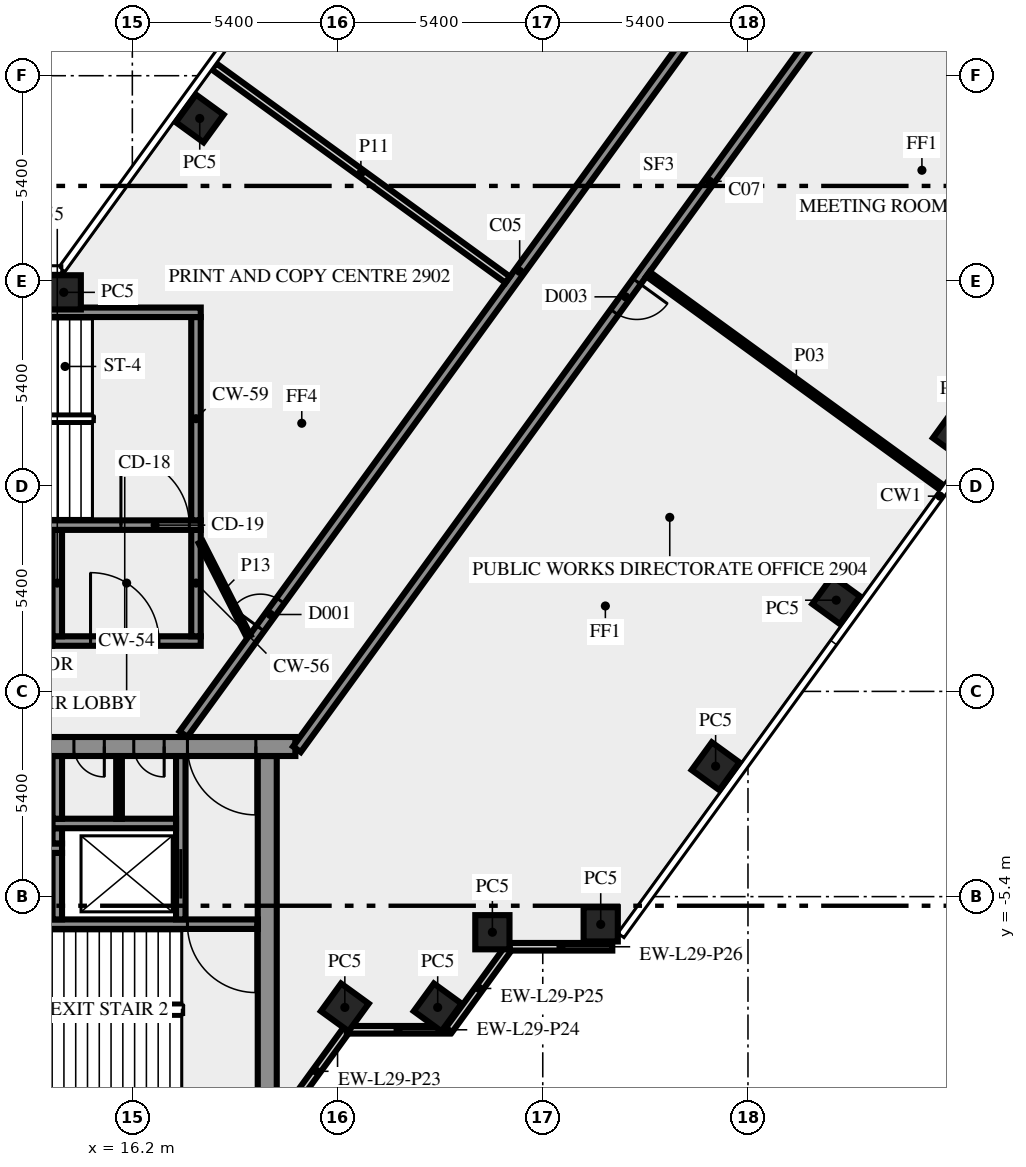
"""IFC4 building model, lengths in metres.
Left out: names, types, materials, properties, quantities, classifications, styles, units other than length and angle.
Written with IfcOpenShell. Run it as: python <this file> out.ifc"""

import sys

from ifc_helpers import new_model, si_unit, direction, frame, frame_2d, origin, origin_2d, place, context, subcontext, project, spatial, rectangle, extrude, element, fill, save


model = new_model("IFC4")
c1 = context("Model", 3, precision=1e-05, world=origin(), true_north=direction((0.0, 1.0)))
c2 = subcontext(c1, "Body", "Model", "MODEL_VIEW")
j1 = project(units=[si_unit("LENGTHUNIT", "METRE"), si_unit("PLANEANGLEUNIT", "RADIAN")], contexts=[c1])
p1 = place(None, origin())
s1 = spatial("IfcSite", under=j1, at=p1, CompositionType="ELEMENT")
p2 = place(p1, origin())
s2 = spatial("IfcBuilding", under=s1, at=p2, CompositionType="ELEMENT")
p3 = place(p2, frame((0.0, 0.0, 125.0)))
s3 = spatial("IfcBuildingStorey", under=s2, at=p3, CompositionType="ELEMENT", Elevation=125.0)
for number, where, z_axis, x_axis in (
    (1, (21.792, -8.315, 0.0), (0.0, 0.0, 1.0), (0.588, 0.809, 0.0)),
    (2, (24.235, -8.315, 0.0), (0.0, 0.0, 1.0), (0.588, 0.809, 0.0)),
    (3, (25.674, -6.337, 0.0), (0.0, 0.0, 1.0), (1.0, 0.0, 0.0)),
    (4, (28.525, -6.13, 0.0), (0.0, 0.0, 1.0), (1.0, 0.0, 0.0)),
    (5, (31.548, -1.969, 0.0), (0.0, 0.0, 1.0), (0.588, 0.809, 0.0)),
    (6, (34.722, 2.4, 0.0), (0.0, 0.0, 1.0), (0.588, 0.809, 0.0)),
    (7, (37.896, 6.769, 0.0), (0.0, 0.0, 1.0), (0.588, 0.809, 0.0)),
    (8, (17.974, 15.075, 0.0), (0.0, 0.0, 1.0), (-0.588, -0.809, 0.0)),
    (9, (14.395, 10.5, 0.0), (0.0, 0.0, 1.0), (-1.0, 0.0, 0.0)),
):
    element("IfcColumn", number, at=place(p3, frame(where, z_axis=z_axis, x_axis=x_axis)), inside=s3, PredefinedType="COLUMN", context=c2, shape_type="SweptSolid", body=[
        extrude(rectangle(XDim=0.9, YDim=0.9, at=origin_2d()), origin(), (0.0, 0.0, 1.0), 3.65),
    ])
p4 = place(p3, frame((20.253, -11.083, 0.0), z_axis=(0.0, 0.0, 1.0), x_axis=(0.587766567315, 0.809030569476, 0.0)))
e10 = element("IfcWall", 10, at=p4, inside=s3, PredefinedType="SOLIDWALL", context=c2, shape_type="SweptSolid", body=[
    extrude(rectangle(XDim=2.688, YDim=0.2, at=frame_2d((1.344, 0.0))), origin(), (0.0, 0.0, 1.0), 3.65),
])
p5 = place(p3, frame((21.843, -8.904, 0.0), z_axis=(0.0, 0.0, 1.0), x_axis=(1.0, 0.0, 0.0)))
e11 = element("IfcWall", 11, at=p5, inside=s3, PredefinedType="SOLIDWALL", context=c2, shape_type="SweptSolid", body=[
    extrude(rectangle(XDim=2.7, YDim=0.2, at=frame_2d((1.35, 0.0))), origin(), (0.0, 0.0, 1.0), 3.65),
])
p6 = place(p3, frame((24.533, -8.909, 0.0), z_axis=(0.0, 0.0, 1.0), x_axis=(0.587720002413, 0.809064397168, 0.0)))
e12 = element("IfcWall", 12, at=p6, inside=s3, PredefinedType="SOLIDWALL", context=c2, shape_type="SweptSolid", body=[
    extrude(rectangle(XDim=2.7, YDim=0.2, at=frame_2d((1.35, 0.0))), origin(), (0.0, 0.0, 1.0), 3.65),
])
p7 = place(p3, frame((26.13, -6.719, 0.0), z_axis=(0.0, 0.0, 1.0), x_axis=(1.0, 0.0, 0.0)))
e13 = element("IfcWall", 13, at=p7, inside=s3, PredefinedType="SOLIDWALL", context=c2, shape_type="SweptSolid", body=[
    extrude(rectangle(XDim=2.7, YDim=0.2, at=frame_2d((1.35, 0.0))), origin(), (0.0, 0.0, 1.0), 3.65),
])
p8 = place(p3, frame((19.75, -10.5, 0.0), z_axis=(0.0, 0.0, 1.0), x_axis=(0.0, 1.0, 0.0)))
e14 = element("IfcWall", 14, at=p8, inside=s3, PredefinedType="SHEAR", context=c2, shape_type="SweptSolid", body=[
    extrude(rectangle(XDim=8.8, YDim=0.5, at=frame_2d((4.4, 0.0))), origin(), (0.0, 0.0, 1.0), 3.65),
])
p9 = place(p3, frame((19.5, -6.125, 0.0), z_axis=(0.0, 0.0, 1.0), x_axis=(-1.0, 0.0, 0.0)))
e15 = element("IfcWall", 15, at=p9, inside=s3, PredefinedType="SHEAR", context=c2, shape_type="SweptSolid", body=[
    extrude(rectangle(XDim=8.05, YDim=0.25, at=frame_2d((4.025, 0.0))), origin(), (0.0, 0.0, 1.0), 3.65),
])
p10 = place(p9, frame((0.05, 0.0, 0.0)))
e16 = element("IfcOpeningElement", 16, at=p10, cuts=e15, PredefinedType="OPENING", context=c2, shape_type="SweptSolid", body=[
    extrude(rectangle(XDim=1.8, YDim=2.1, at=frame_2d((0.9, 1.05))), frame((0.0, 0.135, 0.0), z_axis=(0.0, -1.0, 0.0), x_axis=(1.0, 0.0, 0.0)), (0.0, 0.0, 1.0), 0.27),
])
p11 = place(p3, frame((14.225, -6.0, 0.0), z_axis=(0.0, 0.0, 1.0), x_axis=(0.0, 1.0, 0.0)))
e17 = element("IfcWall", 17, at=p11, inside=s3, PredefinedType="SHEAR", context=c2, shape_type="SweptSolid", body=[
    extrude(rectangle(XDim=1.75, YDim=0.25, at=frame_2d((0.875, 0.0))), origin(), (0.0, 0.0, 1.0), 3.65),
])
p12 = place(p3, frame((17.475, -6.0, 0.0), z_axis=(0.0, 0.0, 1.0), x_axis=(0.0, 1.0, 0.0)))
e18 = element("IfcWall", 18, at=p12, inside=s3, PredefinedType="SHEAR", context=c2, shape_type="SweptSolid", body=[
    extrude(rectangle(XDim=4.3, YDim=0.25, at=frame_2d((2.15, 0.0))), origin(), (0.0, 0.0, 1.0), 3.65),
])
p13 = place(p12, frame((0.55, 0.0, 0.0)))
e19 = element("IfcOpeningElement", 19, at=p13, cuts=e18, PredefinedType="OPENING", context=c2, shape_type="SweptSolid", body=[
    extrude(rectangle(XDim=1.3, YDim=2.1, at=frame_2d((0.65, 1.05))), frame((0.0, 0.135, 0.0), z_axis=(0.0, -1.0, 0.0), x_axis=(1.0, 0.0, 0.0)), (0.0, 0.0, 1.0), 0.27),
])
p14 = place(p3, frame((1.45, -4.125, 0.0), z_axis=(0.0, 0.0, 1.0), x_axis=(1.0, 0.0, 0.0)))
e20 = element("IfcWall", 20, at=p14, inside=s3, PredefinedType="SHEAR", context=c2, shape_type="SweptSolid", body=[
    extrude(rectangle(XDim=12.9, YDim=0.25, at=frame_2d((6.45, 0.0))), origin(), (0.0, 0.0, 1.0), 3.65),
])
p15 = place(p14, frame((0.7, 0.0, 0.0)))
e21 = element("IfcOpeningElement", 21, at=p15, cuts=e20, PredefinedType="OPENING", context=c2, shape_type="SweptSolid", body=[
    extrude(rectangle(XDim=1.3, YDim=2.1, at=frame_2d((0.65, 1.05))), frame((0.0, 0.135, 0.0), z_axis=(0.0, -1.0, 0.0), x_axis=(1.0, 0.0, 0.0)), (0.0, 0.0, 1.0), 0.27),
])
p16 = place(p3, frame((14.225, -4.0, 0.0), z_axis=(0.0, 0.0, 1.0), x_axis=(0.0, 1.0, 0.0)))
e22 = element("IfcWall", 22, at=p16, inside=s3, PredefinedType="SHEAR", context=c2, shape_type="SweptSolid", body=[
    extrude(rectangle(XDim=0.4, YDim=0.25, at=frame_2d((0.2, 0.0))), origin(), (0.0, 0.0, 1.0), 3.65),
])
p17 = place(p3, frame((14.1, -3.475, 0.0), z_axis=(0.0, 0.0, 1.0), x_axis=(1.0, 0.0, 0.0)))
e23 = element("IfcWall", 23, at=p17, inside=s3, PredefinedType="SHEAR", context=c2, shape_type="SweptSolid", body=[
    extrude(rectangle(XDim=3.25, YDim=0.25, at=frame_2d((1.625, 0.0))), origin(), (0.0, 0.0, 1.0), 3.65),
])
p18 = place(p3, frame((14.225, -3.35, 0.0), z_axis=(0.0, 0.0, 1.0), x_axis=(0.0, 1.0, 0.0)))
e24 = element("IfcWall", 24, at=p18, inside=s3, PredefinedType="SHEAR", context=c2, shape_type="SweptSolid", body=[
    extrude(rectangle(XDim=1.65, YDim=0.25, at=frame_2d((0.825, 0.0))), origin(), (0.0, 0.0, 1.0), 3.65),
])
p19 = place(p3, frame((15.85, -3.35, 0.0), z_axis=(0.0, 0.0, 1.0), x_axis=(0.0, 1.0, 0.0)))
e25 = element("IfcWall", 25, at=p19, inside=s3, PredefinedType="PARTITIONING", context=c2, shape_type="SweptSolid", body=[
    extrude(rectangle(XDim=1.65, YDim=0.15, at=frame_2d((0.825, 0.0))), origin(), (0.0, 0.0, 1.0), 3.65),
])
p20 = place(p3, frame((20.49, -1.45, 0.0), z_axis=(0.0, 0.0, 1.0), x_axis=(-1.0, 0.0, 0.0)))
e26 = element("IfcWall", 26, at=p20, inside=s3, PredefinedType="SHEAR", context=c2, shape_type="SweptSolid", body=[
    extrude(rectangle(XDim=40.98, YDim=0.5, at=frame_2d((20.49, 0.0))), origin(), (0.0, 0.0, 1.0), 3.65),
])
p21 = place(p20, frame((38.14, 0.0, 0.0)))
e27 = element("IfcOpeningElement", 27, at=p21, cuts=e26, PredefinedType="OPENING", context=c2, shape_type="SweptSolid", body=[
    extrude(rectangle(XDim=1.8, YDim=2.1, at=frame_2d((0.9, 1.05))), frame((0.0, 0.26, 0.0), z_axis=(0.0, -1.0, 0.0), x_axis=(1.0, 0.0, 0.0)), (0.0, 0.0, 1.0), 0.52),
])
p22 = place(p20, frame((35.89, 0.0, 0.0)))
e28 = element("IfcOpeningElement", 28, at=p22, cuts=e26, PredefinedType="OPENING", context=c2, shape_type="SweptSolid", body=[
    extrude(rectangle(XDim=0.9, YDim=2.1, at=frame_2d((0.45, 1.05))), frame((0.0, 0.26, 0.0), z_axis=(0.0, -1.0, 0.0), x_axis=(1.0, 0.0, 0.0)), (0.0, 0.0, 1.0), 0.52),
])
p23 = place(p20, frame((32.94, 0.0, 0.0)))
e29 = element("IfcOpeningElement", 29, at=p23, cuts=e26, PredefinedType="OPENING", context=c2, shape_type="SweptSolid", body=[
    extrude(rectangle(XDim=0.9, YDim=2.1, at=frame_2d((0.45, 1.05))), frame((0.0, 0.26, 0.0), z_axis=(0.0, -1.0, 0.0), x_axis=(1.0, 0.0, 0.0)), (0.0, 0.0, 1.0), 0.52),
])
p24 = place(p20, frame((19.59, 0.0, 0.0)))
e30 = element("IfcOpeningElement", 30, at=p24, cuts=e26, PredefinedType="OPENING", context=c2, shape_type="SweptSolid", body=[
    extrude(rectangle(XDim=2.0, YDim=2.1, at=frame_2d((1.0, 1.05))), frame((0.0, 0.26, 0.0), z_axis=(0.0, -1.0, 0.0), x_axis=(1.0, 0.0, 0.0)), (0.0, 0.0, 1.0), 0.52),
])
p25 = place(p20, frame((7.14, 0.0, 0.0)))
e31 = element("IfcOpeningElement", 31, at=p25, cuts=e26, PredefinedType="OPENING", context=c2, shape_type="SweptSolid", body=[
    extrude(rectangle(XDim=0.9, YDim=2.1, at=frame_2d((0.45, 1.05))), frame((0.0, 0.26, 0.0), z_axis=(0.0, -1.0, 0.0), x_axis=(1.0, 0.0, 0.0)), (0.0, 0.0, 1.0), 0.52),
])
p26 = place(p20, frame((5.028, 0.0, 0.0)))
e32 = element("IfcOpeningElement", 32, at=p26, cuts=e26, PredefinedType="OPENING", context=c2, shape_type="SweptSolid", body=[
    extrude(rectangle(XDim=0.8, YDim=2.1, at=frame_2d((0.4, 1.05))), frame((0.0, 0.26, 0.0), z_axis=(0.0, -1.0, 0.0), x_axis=(1.0, 0.0, 0.0)), (0.0, 0.0, 1.0), 0.52),
])
p27 = place(p20, frame((3.452, 0.0, 0.0)))
e33 = element("IfcOpeningElement", 33, at=p27, cuts=e26, PredefinedType="OPENING", context=c2, shape_type="SweptSolid", body=[
    extrude(rectangle(XDim=0.8, YDim=2.1, at=frame_2d((0.4, 1.05))), frame((0.0, 0.26, 0.0), z_axis=(0.0, -1.0, 0.0), x_axis=(1.0, 0.0, 0.0)), (0.0, 0.0, 1.0), 0.52),
])
p28 = place(p20, frame((1.04, 0.0, 0.0)))
e34 = element("IfcOpeningElement", 34, at=p28, cuts=e26, PredefinedType="OPENING", context=c2, shape_type="SweptSolid", body=[
    extrude(rectangle(XDim=1.8, YDim=2.1, at=frame_2d((0.9, 1.05))), frame((0.0, 0.26, 0.0), z_axis=(0.0, -1.0, 0.0), x_axis=(1.0, 0.0, 0.0)), (0.0, 0.0, 1.0), 0.52),
])
p29 = place(p3, frame((14.1, 1.325, 0.0), z_axis=(0.0, 0.0, 1.0), x_axis=(1.0, 0.0, 0.0)))
e35 = element("IfcWall", 35, at=p29, inside=s3, PredefinedType="SHEAR", context=c2, shape_type="SweptSolid", body=[
    extrude(rectangle(XDim=3.9, YDim=0.25, at=frame_2d((1.95, 0.0))), origin(), (0.0, 0.0, 1.0), 3.65),
])
p30 = place(p29, frame((1.0, 0.0, 0.0)))
e36 = element("IfcOpeningElement", 36, at=p30, cuts=e35, PredefinedType="OPENING", context=c2, shape_type="SweptSolid", body=[
    extrude(rectangle(XDim=1.8, YDim=2.1, at=frame_2d((0.9, 1.05))), frame((0.0, 0.135, 0.0), z_axis=(0.0, -1.0, 0.0), x_axis=(1.0, 0.0, 0.0)), (0.0, 0.0, 1.0), 0.27),
])
for number, where, z_axis, x_axis in (
    (37, (14.225, 1.45, 0.0), (0.0, 0.0, 1.0), (0.0, 1.0, 0.0)),
    (38, (17.875, 1.45, 0.0), (0.0, 0.0, 1.0), (0.0, 1.0, 0.0)),
):
    element("IfcWall", number, at=place(p3, frame(where, z_axis=z_axis, x_axis=x_axis)), inside=s3, PredefinedType="SHEAR", context=c2, shape_type="SweptSolid", body=[
        extrude(rectangle(XDim=2.8, YDim=0.25, at=frame_2d((1.4, 0.0))), origin(), (0.0, 0.0, 1.0), 3.65),
    ])
p31 = place(p3, frame((7.5, 4.375, 0.0), z_axis=(0.0, 0.0, 1.0), x_axis=(1.0, 0.0, 0.0)))
e39 = element("IfcWall", 39, at=p31, inside=s3, PredefinedType="SHEAR", context=c2, shape_type="SweptSolid", body=[
    extrude(rectangle(XDim=10.5, YDim=0.25, at=frame_2d((5.25, 0.0))), origin(), (0.0, 0.0, 1.0), 3.65),
])
p32 = place(p31, frame((8.4, 0.0, 0.0)))
e40 = element("IfcOpeningElement", 40, at=p32, cuts=e39, PredefinedType="OPENING", context=c2, shape_type="SweptSolid", body=[
    extrude(rectangle(XDim=1.8, YDim=2.1, at=frame_2d((0.9, 1.05))), frame((0.0, 0.135, 0.0), z_axis=(0.0, -1.0, 0.0), x_axis=(1.0, 0.0, 0.0)), (0.0, 0.0, 1.0), 0.27),
])
p33 = place(p3, frame((17.875, 4.5, 0.0), z_axis=(0.0, 0.0, 1.0), x_axis=(0.0, 1.0, 0.0)))
e41 = element("IfcWall", 41, at=p33, inside=s3, PredefinedType="SHEAR", context=c2, shape_type="SweptSolid", body=[
    extrude(rectangle(XDim=5.35, YDim=0.25, at=frame_2d((2.675, 0.0))), origin(), (0.0, 0.0, 1.0), 3.65),
])
p34 = place(p3, frame((7.5, 9.975, 0.0), z_axis=(0.0, 0.0, 1.0), x_axis=(1.0, 0.0, 0.0)))
e42 = element("IfcWall", 42, at=p34, inside=s3, PredefinedType="SHEAR", context=c2, shape_type="SweptSolid", body=[
    extrude(rectangle(XDim=10.5, YDim=0.25, at=frame_2d((5.25, 0.0))), origin(), (0.0, 0.0, 1.0), 3.65),
])
p35 = place(p34, frame((2.0, 0.0, 1.0)))
e43 = element("IfcOpeningElement", 43, at=p35, cuts=e42, PredefinedType="OPENING", context=c2, shape_type="SweptSolid", body=[
    extrude(rectangle(XDim=1.2, YDim=1.2, at=frame_2d((0.6, 0.6))), frame((0.0, 0.135, 0.0), z_axis=(0.0, -1.0, 0.0), x_axis=(1.0, 0.0, 0.0)), (0.0, 0.0, 1.0), 0.27),
])
p36 = place(p3, frame((17.545, -1.125, 0.0), z_axis=(0.0, 0.0, 1.0), x_axis=(0.587786330937, 0.809016210693, 0.0)))
e44 = element("IfcWall", 44, at=p36, inside=s3, PredefinedType="SOLIDWALL", context=c2, shape_type="SweptSolid", body=[
    extrude(rectangle(XDim=30.103, YDim=0.25, at=frame_2d((15.052, 0.0))), origin(), (0.0, 0.0, 1.0), 3.65),
])
p37 = place(p36, frame((3.441, 0.0, 0.0)))
e45 = element("IfcOpeningElement", 45, at=p37, cuts=e44, PredefinedType="OPENING", context=c2, shape_type="SweptSolid", body=[
    extrude(rectangle(XDim=0.9, YDim=2.1, at=frame_2d((0.45, 1.05))), frame((0.0, 0.135, 0.0), z_axis=(0.0, -1.0, 0.0), x_axis=(1.0, 0.0, 0.0)), (0.0, 0.0, 1.0), 0.27),
])
p38 = place(p36, frame((28.729, 0.0, 0.0)))
e46 = element("IfcOpeningElement", 46, at=p38, cuts=e44, PredefinedType="OPENING", context=c2, shape_type="SweptSolid", body=[
    extrude(rectangle(XDim=0.9, YDim=2.1, at=frame_2d((0.45, 1.05))), frame((0.0, 0.135, 0.0), z_axis=(0.0, -1.0, 0.0), x_axis=(1.0, 0.0, 0.0)), (0.0, 0.0, 1.0), 0.27),
])
p39 = place(p3, frame((37.236, 21.469, 0.0), z_axis=(0.0, 0.0, 1.0), x_axis=(-0.58778344073, -0.809018310549, 0.0)))
e47 = element("IfcWall", 47, at=p39, inside=s3, PredefinedType="SOLIDWALL", context=c2, shape_type="SweptSolid", body=[
    extrude(rectangle(XDim=28.42, YDim=0.25, at=frame_2d((14.21, 0.0))), origin(), (0.0, 0.0, 1.0), 3.65),
])
p40 = place(p39, frame((13.205, 0.0, 0.0)))
e48 = element("IfcOpeningElement", 48, at=p40, cuts=e47, PredefinedType="OPENING", context=c2, shape_type="SweptSolid", body=[
    extrude(rectangle(XDim=1.0, YDim=2.1, at=frame_2d((0.5, 1.05))), frame((0.0, 0.135, 0.0), z_axis=(0.0, -1.0, 0.0), x_axis=(1.0, 0.0, 0.0)), (0.0, 0.0, 1.0), 0.27),
])
p41 = place(p39, frame((0.224, 0.0, 0.0)))
e49 = element("IfcOpeningElement", 49, at=p41, cuts=e47, PredefinedType="OPENING", context=c2, shape_type="SweptSolid", body=[
    extrude(rectangle(XDim=0.9, YDim=2.1, at=frame_2d((0.45, 1.05))), frame((0.0, 0.135, 0.0), z_axis=(0.0, -1.0, 0.0), x_axis=(1.0, 0.0, 0.0)), (0.0, 0.0, 1.0), 0.27),
])
p42 = place(p3, frame((37.577, 5.307, 0.0), z_axis=(0.0, 0.0, 1.0), x_axis=(-0.809032429128, 0.587764007591, 0.0)))
e50 = element("IfcWall", 50, at=p42, inside=s3, PredefinedType="PARTITIONING", context=c2, shape_type="SweptSolid", body=[
    extrude(rectangle(XDim=9.651, YDim=0.15, at=frame_2d((4.826, 0.0))), origin(), (0.0, 0.0, 1.0), 2.75),
])
p43 = place(p3, frame((26.077, 10.832, 0.0), z_axis=(0.0, 0.0, 1.0), x_axis=(-0.809052142986, 0.587736871338, 0.0)))
e51 = element("IfcWall", 51, at=p43, inside=s3, PredefinedType="SOLIDWALL", context=c2, shape_type="SweptSolid", body=[
    extrude(rectangle(XDim=9.55, YDim=0.2, at=frame_2d((4.775, 0.0))), origin(), (0.0, 0.0, 1.0), 2.75),
])
p44 = place(p3, frame((18.0, 3.925, 0.0), z_axis=(0.0, 0.0, 1.0), x_axis=(0.453950796792, -0.891026752736, 0.0)))
e52 = element("IfcWall", 52, at=p44, inside=s3, PredefinedType="PARTITIONING", context=c2, shape_type="SweptSolid", body=[
    extrude(rectangle(XDim=2.778, YDim=0.12, at=frame_2d((1.389, 0.0))), origin(), (0.0, 0.0, 1.0), 3.65),
])
p45 = place(p10, origin())
e53 = element("IfcDoor", 53, at=p45, inside=s3, OperationType="DOUBLE_DOOR_SINGLE_SWING", PredefinedType="DOOR", context=c2, shape_type="SweptSolid", body=[
    extrude(rectangle(XDim=1.8, YDim=2.1, at=frame_2d((0.9, 1.05))), frame((0.0, 0.025, 0.0), z_axis=(0.0, -1.0, 0.0), x_axis=(1.0, 0.0, 0.0)), (0.0, 0.0, 1.0), 0.05),
])
fill(e16, e53)
p46 = place(p13, origin())
e54 = element("IfcDoor", 54, at=p46, inside=s3, OperationType="DOUBLE_DOOR_SLIDING", PredefinedType="DOOR", context=c2, shape_type="SweptSolid", body=[
    extrude(rectangle(XDim=1.3, YDim=2.1, at=frame_2d((0.65, 1.05))), frame((0.0, 0.025, 0.0), z_axis=(0.0, -1.0, 0.0), x_axis=(1.0, 0.0, 0.0)), (0.0, 0.0, 1.0), 0.05),
])
fill(e19, e54)
p47 = place(p26, origin())
e55 = element("IfcDoor", 55, at=p47, inside=s3, OperationType="SINGLE_SWING_LEFT", PredefinedType="DOOR", context=c2, shape_type="SweptSolid", body=[
    extrude(rectangle(XDim=0.8, YDim=2.1, at=frame_2d((0.4, 1.05))), frame((0.0, 0.025, 0.0), z_axis=(0.0, -1.0, 0.0), x_axis=(1.0, 0.0, 0.0)), (0.0, 0.0, 1.0), 0.05),
])
fill(e32, e55)
p48 = place(p27, origin())
e56 = element("IfcDoor", 56, at=p48, inside=s3, OperationType="SINGLE_SWING_LEFT", PredefinedType="DOOR", context=c2, shape_type="SweptSolid", body=[
    extrude(rectangle(XDim=0.8, YDim=2.1, at=frame_2d((0.4, 1.05))), frame((0.0, 0.025, 0.0), z_axis=(0.0, -1.0, 0.0), x_axis=(1.0, 0.0, 0.0)), (0.0, 0.0, 1.0), 0.05),
])
fill(e33, e56)
p49 = place(p28, origin())
e57 = element("IfcDoor", 57, at=p49, inside=s3, OperationType="DOUBLE_DOOR_SINGLE_SWING", PredefinedType="DOOR", context=c2, shape_type="SweptSolid", body=[
    extrude(rectangle(XDim=1.8, YDim=2.1, at=frame_2d((0.9, 1.05))), frame((0.0, 0.025, 0.0), z_axis=(0.0, -1.0, 0.0), x_axis=(1.0, 0.0, 0.0)), (0.0, 0.0, 1.0), 0.05),
])
fill(e34, e57)
p50 = place(p30, origin())
e58 = element("IfcDoor", 58, at=p50, inside=s3, OperationType="DOUBLE_DOOR_SINGLE_SWING", PredefinedType="DOOR", context=c2, shape_type="SweptSolid", body=[
    extrude(rectangle(XDim=1.8, YDim=2.1, at=frame_2d((0.9, 1.05))), frame((0.0, 0.025, 0.0), z_axis=(0.0, -1.0, 0.0), x_axis=(1.0, 0.0, 0.0)), (0.0, 0.0, 1.0), 0.05),
])
fill(e36, e58)
p51 = place(p32, origin())
e59 = element("IfcDoor", 59, at=p51, inside=s3, OperationType="DOUBLE_DOOR_SINGLE_SWING", PredefinedType="DOOR", context=c2, shape_type="SweptSolid", body=[
    extrude(rectangle(XDim=1.8, YDim=2.1, at=frame_2d((0.9, 1.05))), frame((0.0, 0.025, 0.0), z_axis=(0.0, -1.0, 0.0), x_axis=(1.0, 0.0, 0.0)), (0.0, 0.0, 1.0), 0.05),
])
fill(e40, e59)
p52 = place(p40, origin())
e60 = element("IfcDoor", 60, at=p52, inside=s3, OperationType="SINGLE_SWING_LEFT", PredefinedType="DOOR", context=c2, shape_type="SweptSolid", body=[
    extrude(rectangle(XDim=1.0, YDim=2.1, at=frame_2d((0.5, 1.05))), frame((0.0, 0.025, 0.0), z_axis=(0.0, -1.0, 0.0), x_axis=(1.0, 0.0, 0.0)), (0.0, 0.0, 1.0), 0.05),
])
fill(e48, e60)
p53 = place(p37, origin())
e61 = element("IfcDoor", 61, at=p53, inside=s3, OperationType="SINGLE_SWING_LEFT", PredefinedType="DOOR", context=c2, shape_type="SweptSolid", body=[
    extrude(rectangle(XDim=0.9, YDim=2.1, at=frame_2d((0.45, 1.05))), frame((0.0, 0.025, 0.0), z_axis=(0.0, -1.0, 0.0), x_axis=(1.0, 0.0, 0.0)), (0.0, 0.0, 1.0), 0.05),
])
fill(e45, e61)
save(model, sys.argv[1])
